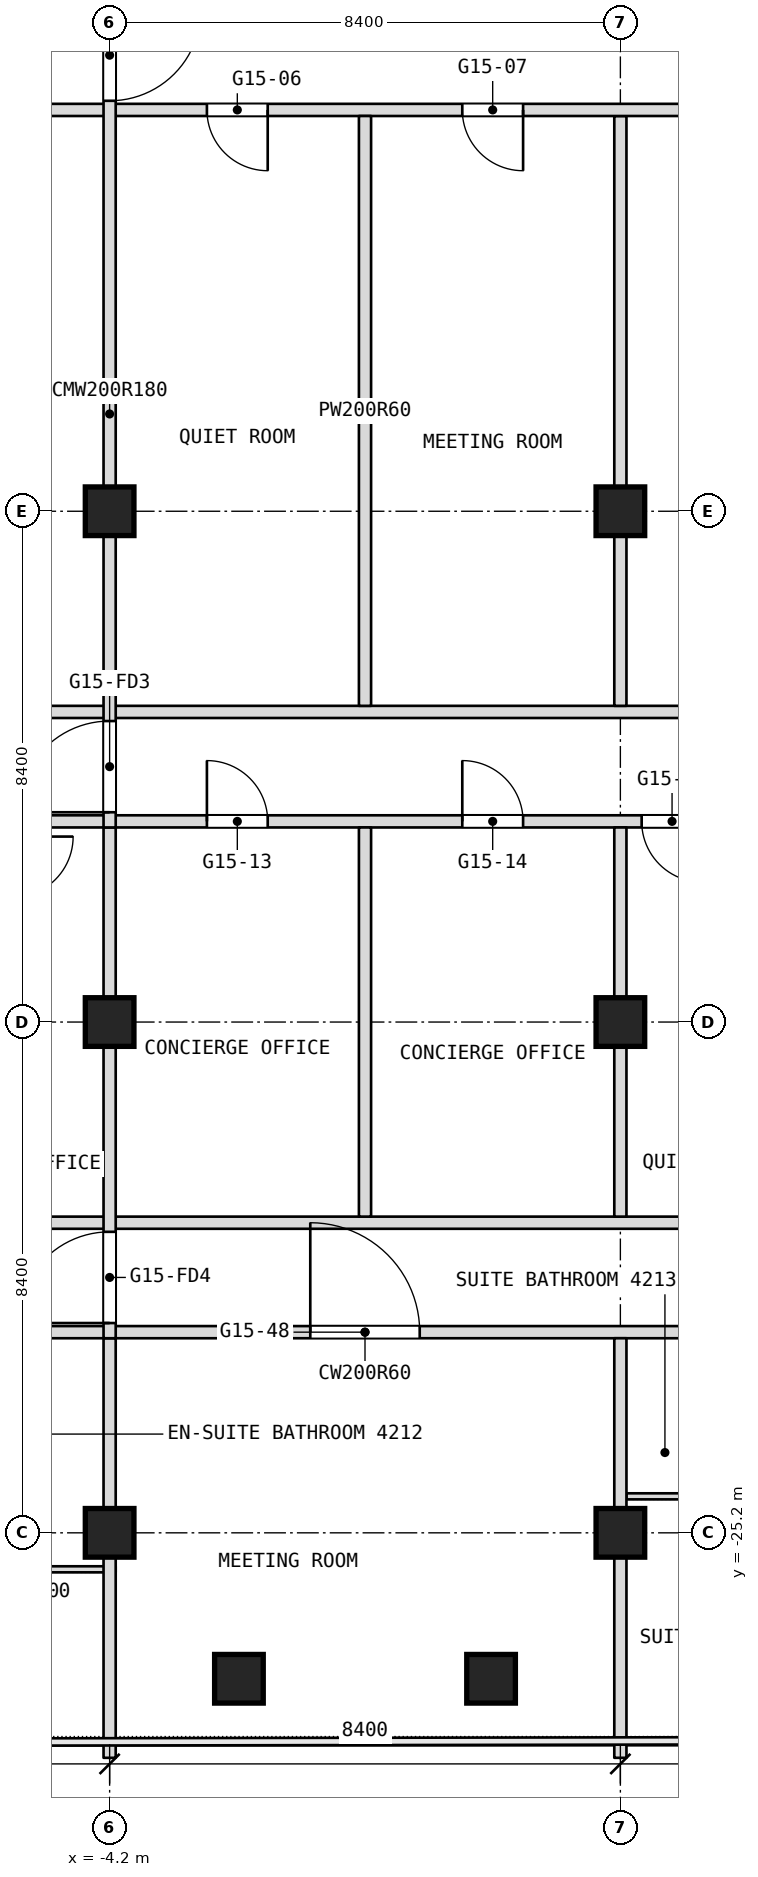
"""IFC4 building model, lengths in metres.
Left out: names, types, materials, properties, quantities, classifications, styles, units other than length and angle.
Written with IfcOpenShell. Run it as: python <this file> out.ifc"""

import sys

from ifc_helpers import new_model, si_unit, direction, frame, frame_2d, origin, origin_2d, place, context, subcontext, project, spatial, rectangle, extrude, element, fill, save


model = new_model("IFC4")
c1 = context("Model", 3, precision=1e-05, world=origin(), true_north=direction((0.0, 1.0)))
c2 = subcontext(c1, "Body", "Model", "MODEL_VIEW")
j1 = project(units=[si_unit("LENGTHUNIT", "METRE"), si_unit("PLANEANGLEUNIT", "RADIAN")], contexts=[c1])
p1 = place(None, origin())
s1 = spatial("IfcSite", under=j1, at=p1, CompositionType="ELEMENT")
p2 = place(p1, origin())
s2 = spatial("IfcBuilding", under=s1, at=p2, CompositionType="ELEMENT")
p3 = place(p2, frame((0.0, 0.0, 187.7)))
s3 = spatial("IfcBuildingStorey", under=s2, at=p3, CompositionType="ELEMENT", Elevation=187.7)
for number, where, z_axis, x_axis in (
    (1, (-4.2, -25.2, 0.0), (0.0, 0.0, 1.0), (1.0, 0.0, 0.0)),
    (2, (-4.2, -16.8, 0.0), (0.0, 0.0, 1.0), (1.0, 0.0, 0.0)),
    (3, (-4.2, -8.4, 0.0), (0.0, 0.0, 1.0), (1.0, 0.0, 0.0)),
    (4, (4.2, -25.2, 0.0), (0.0, 0.0, 1.0), (1.0, 0.0, 0.0)),
    (5, (4.2, -16.8, 0.0), (0.0, 0.0, 1.0), (1.0, 0.0, 0.0)),
    (6, (4.2, -8.4, 0.0), (0.0, 0.0, 1.0), (1.0, 0.0, 0.0)),
    (7, (2.073, -27.6, 0.0), (0.0, 0.0, 1.0), (1.0, 0.0, 0.0)),
    (8, (-2.073, -27.6, 0.0), (0.0, 0.0, 1.0), (1.0, 0.0, 0.0)),
):
    element("IfcColumn", number, at=place(p3, frame(where, z_axis=z_axis, x_axis=x_axis)), inside=s3, PredefinedType="COLUMN", context=c2, shape_type="SweptSolid", body=[
        extrude(rectangle(XDim=0.8, YDim=0.8, at=origin_2d()), origin(), (0.0, 0.0, 1.0), 3.6),
    ])
p4 = place(p3, frame((-6.55, -25.8, 0.0), z_axis=(0.0, 0.0, 1.0), x_axis=(1.0, 0.0, 0.0)))
e9 = element("IfcWall", 9, at=p4, inside=s3, PredefinedType="PARTITIONING", context=c2, shape_type="SweptSolid", body=[
    extrude(rectangle(XDim=2.45, YDim=0.1, at=frame_2d((1.225, 0.0))), origin(), (0.0, 0.0, 1.0), 3.34),
])
p5 = place(p4, frame((0.15, 0.0, 0.0)))
e10 = element("IfcOpeningElement", 10, at=p5, cuts=e9, PredefinedType="OPENING", context=c2, shape_type="SweptSolid", body=[
    extrude(rectangle(XDim=0.9, YDim=2.1, at=frame_2d((0.45, 1.05))), frame((0.0, 0.05, 0.0), z_axis=(0.0, -1.0, 0.0), x_axis=(1.0, 0.0, 0.0)), (0.0, 0.0, 1.0), 0.1),
])
p6 = place(p3, frame((4.3, -24.6, 0.0), z_axis=(0.0, 0.0, 1.0), x_axis=(1.0, 0.0, 0.0)))
e11 = element("IfcWall", 11, at=p6, inside=s3, PredefinedType="PARTITIONING", context=c2, shape_type="SweptSolid", body=[
    extrude(rectangle(XDim=2.35, YDim=0.1, at=frame_2d((1.175, 0.0))), origin(), (0.0, 0.0, 1.0), 3.34),
])
p7 = place(p3, frame((-16.7, -21.9, 0.0), z_axis=(0.0, 0.0, 1.0), x_axis=(1.0, 0.0, 0.0)))
e12 = element("IfcWall", 12, at=p7, inside=s3, PredefinedType="PARTITIONING", context=c2, shape_type="SweptSolid", body=[
    extrude(rectangle(XDim=33.4, YDim=0.2, at=frame_2d((16.7, 0.0))), origin(), (0.0, 0.0, 1.0), 3.34),
])
p8 = place(p7, frame((0.3, 0.0, 0.0)))
e13 = element("IfcOpeningElement", 13, at=p8, cuts=e12, PredefinedType="OPENING", context=c2, shape_type="SweptSolid", body=[
    extrude(rectangle(XDim=1.0, YDim=2.1, at=frame_2d((0.5, 1.05))), frame((0.0, 0.1, 0.0), z_axis=(0.0, -1.0, 0.0), x_axis=(1.0, 0.0, 0.0)), (0.0, 0.0, 1.0), 0.2),
])
p9 = place(p7, frame((6.9, 0.0, 0.0)))
e14 = element("IfcOpeningElement", 14, at=p9, cuts=e12, PredefinedType="OPENING", context=c2, shape_type="SweptSolid", body=[
    extrude(rectangle(XDim=1.0, YDim=2.1, at=frame_2d((0.5, 1.05))), frame((0.0, 0.1, 0.0), z_axis=(0.0, -1.0, 0.0), x_axis=(1.0, 0.0, 0.0)), (0.0, 0.0, 1.0), 0.2),
])
p10 = place(p7, frame((8.7, 0.0, 0.0)))
e15 = element("IfcOpeningElement", 15, at=p10, cuts=e12, PredefinedType="OPENING", context=c2, shape_type="SweptSolid", body=[
    extrude(rectangle(XDim=1.0, YDim=2.1, at=frame_2d((0.5, 1.05))), frame((0.0, 0.1, 0.0), z_axis=(0.0, -1.0, 0.0), x_axis=(1.0, 0.0, 0.0)), (0.0, 0.0, 1.0), 0.2),
])
p11 = place(p7, frame((15.8, 0.0, 0.0)))
e16 = element("IfcOpeningElement", 16, at=p11, cuts=e12, PredefinedType="OPENING", context=c2, shape_type="SweptSolid", body=[
    extrude(rectangle(XDim=1.8, YDim=2.1, at=frame_2d((0.9, 1.05))), frame((0.0, 0.1, 0.0), z_axis=(0.0, -1.0, 0.0), x_axis=(1.0, 0.0, 0.0)), (0.0, 0.0, 1.0), 0.2),
])
p12 = place(p7, frame((26.65, 0.0, 0.0)))
e17 = element("IfcOpeningElement", 17, at=p12, cuts=e12, PredefinedType="OPENING", context=c2, shape_type="SweptSolid", body=[
    extrude(rectangle(XDim=1.1, YDim=2.1, at=frame_2d((0.55, 1.05))), frame((0.0, 0.1, 0.0), z_axis=(0.0, -1.0, 0.0), x_axis=(1.0, 0.0, 0.0)), (0.0, 0.0, 1.0), 0.2),
])
p13 = place(p7, frame((29.7, 0.0, 0.0)))
e18 = element("IfcOpeningElement", 18, at=p13, cuts=e12, PredefinedType="OPENING", context=c2, shape_type="SweptSolid", body=[
    extrude(rectangle(XDim=1.0, YDim=2.1, at=frame_2d((0.5, 1.05))), frame((0.0, 0.1, 0.0), z_axis=(0.0, -1.0, 0.0), x_axis=(1.0, 0.0, 0.0)), (0.0, 0.0, 1.0), 0.2),
])
p14 = place(p3, frame((-16.7, -20.1, 0.0), z_axis=(0.0, 0.0, 1.0), x_axis=(1.0, 0.0, 0.0)))
e19 = element("IfcWall", 19, at=p14, inside=s3, PredefinedType="PARTITIONING", context=c2, shape_type="SweptSolid", body=[
    extrude(rectangle(XDim=33.4, YDim=0.2, at=frame_2d((16.7, 0.0))), origin(), (0.0, 0.0, 1.0), 3.34),
])
p15 = place(p3, frame((-5.9, -13.5, 0.0), z_axis=(0.0, 0.0, 1.0), x_axis=(1.0, 0.0, 0.0)))
e20 = element("IfcWall", 20, at=p15, inside=s3, PredefinedType="PARTITIONING", context=c2, shape_type="SweptSolid", body=[
    extrude(rectangle(XDim=11.6, YDim=0.2, at=frame_2d((5.8, 0.0))), origin(), (0.0, 0.0, 1.0), 3.34),
])
p16 = place(p15, frame((3.3, 0.0, 0.0)))
e21 = element("IfcOpeningElement", 21, at=p16, cuts=e20, PredefinedType="OPENING", context=c2, shape_type="SweptSolid", body=[
    extrude(rectangle(XDim=1.0, YDim=2.1, at=frame_2d((0.5, 1.05))), frame((0.0, 0.1, 0.0), z_axis=(0.0, -1.0, 0.0), x_axis=(1.0, 0.0, 0.0)), (0.0, 0.0, 1.0), 0.2),
])
p17 = place(p15, frame((7.5, 0.0, 0.0)))
e22 = element("IfcOpeningElement", 22, at=p17, cuts=e20, PredefinedType="OPENING", context=c2, shape_type="SweptSolid", body=[
    extrude(rectangle(XDim=1.0, YDim=2.1, at=frame_2d((0.5, 1.05))), frame((0.0, 0.1, 0.0), z_axis=(0.0, -1.0, 0.0), x_axis=(1.0, 0.0, 0.0)), (0.0, 0.0, 1.0), 0.2),
])
p18 = place(p15, frame((10.45, 0.0, 0.0)))
e23 = element("IfcOpeningElement", 23, at=p18, cuts=e20, PredefinedType="OPENING", context=c2, shape_type="SweptSolid", body=[
    extrude(rectangle(XDim=1.0, YDim=2.1, at=frame_2d((0.5, 1.05))), frame((0.0, 0.1, 0.0), z_axis=(0.0, -1.0, 0.0), x_axis=(1.0, 0.0, 0.0)), (0.0, 0.0, 1.0), 0.2),
])
p19 = place(p3, frame((-7.3, -11.7, 0.0), z_axis=(0.0, 0.0, 1.0), x_axis=(1.0, 0.0, 0.0)))
e24 = element("IfcWall", 24, at=p19, inside=s3, PredefinedType="PARTITIONING", context=c2, shape_type="SweptSolid", body=[
    extrude(rectangle(XDim=14.6, YDim=0.2, at=frame_2d((7.3, 0.0))), origin(), (0.0, 0.0, 1.0), 3.34),
])
p20 = place(p3, frame((4.2, -28.9, 0.0), z_axis=(0.0, 0.0, 1.0), x_axis=(0.0, 1.0, 0.0)))
e25 = element("IfcWall", 25, at=p20, inside=s3, PredefinedType="PARTITIONING", context=c2, shape_type="SweptSolid", body=[
    extrude(rectangle(XDim=6.9, YDim=0.2, at=frame_2d((3.45, 0.0))), origin(), (0.0, 0.0, 1.0), 3.34),
])
p21 = place(p3, frame((4.2, -20.0, 0.0), z_axis=(0.0, 0.0, 1.0), x_axis=(0.0, 1.0, 0.0)))
e26 = element("IfcWall", 26, at=p21, inside=s3, PredefinedType="PARTITIONING", context=c2, shape_type="SweptSolid", body=[
    extrude(rectangle(XDim=6.4, YDim=0.2, at=frame_2d((3.2, 0.0))), origin(), (0.0, 0.0, 1.0), 3.34),
])
p22 = place(p3, frame((4.2, -11.6, 0.0), z_axis=(0.0, 0.0, 1.0), x_axis=(0.0, 1.0, 0.0)))
e27 = element("IfcWall", 27, at=p22, inside=s3, PredefinedType="PARTITIONING", context=c2, shape_type="SweptSolid", body=[
    extrude(rectangle(XDim=9.7, YDim=0.2, at=frame_2d((4.85, 0.0))), origin(), (0.0, 0.0, 1.0), 3.34),
])
p23 = place(p3, frame((-16.9, -1.8, 0.0), z_axis=(0.0, 0.0, 1.0), x_axis=(1.0, 0.0, 0.0)))
e28 = element("IfcWall", 28, at=p23, inside=s3, PredefinedType="PARTITIONING", context=c2, shape_type="SweptSolid", body=[
    extrude(rectangle(XDim=33.8, YDim=0.2, at=frame_2d((16.9, 0.0))), origin(), (0.0, 0.0, 1.0), 3.34),
])
p24 = place(p23, frame((1.7, 0.0, 0.0)))
e29 = element("IfcOpeningElement", 29, at=p24, cuts=e28, PredefinedType="OPENING", context=c2, shape_type="SweptSolid", body=[
    extrude(rectangle(XDim=1.0, YDim=2.1, at=frame_2d((0.5, 1.05))), frame((0.0, 0.1, 0.0), z_axis=(0.0, -1.0, 0.0), x_axis=(1.0, 0.0, 0.0)), (0.0, 0.0, 1.0), 0.2),
])
p25 = place(p23, frame((5.9, 0.0, 0.0)))
e30 = element("IfcOpeningElement", 30, at=p25, cuts=e28, PredefinedType="OPENING", context=c2, shape_type="SweptSolid", body=[
    extrude(rectangle(XDim=1.0, YDim=2.1, at=frame_2d((0.5, 1.05))), frame((0.0, 0.1, 0.0), z_axis=(0.0, -1.0, 0.0), x_axis=(1.0, 0.0, 0.0)), (0.0, 0.0, 1.0), 0.2),
])
p26 = place(p23, frame((10.1, 0.0, 0.0)))
e31 = element("IfcOpeningElement", 31, at=p26, cuts=e28, PredefinedType="OPENING", context=c2, shape_type="SweptSolid", body=[
    extrude(rectangle(XDim=1.0, YDim=2.1, at=frame_2d((0.5, 1.05))), frame((0.0, 0.1, 0.0), z_axis=(0.0, -1.0, 0.0), x_axis=(1.0, 0.0, 0.0)), (0.0, 0.0, 1.0), 0.2),
])
p27 = place(p23, frame((14.3, 0.0, 0.0)))
e32 = element("IfcOpeningElement", 32, at=p27, cuts=e28, PredefinedType="OPENING", context=c2, shape_type="SweptSolid", body=[
    extrude(rectangle(XDim=1.0, YDim=2.1, at=frame_2d((0.5, 1.05))), frame((0.0, 0.1, 0.0), z_axis=(0.0, -1.0, 0.0), x_axis=(1.0, 0.0, 0.0)), (0.0, 0.0, 1.0), 0.2),
])
p28 = place(p23, frame((18.5, 0.0, 0.0)))
e33 = element("IfcOpeningElement", 33, at=p28, cuts=e28, PredefinedType="OPENING", context=c2, shape_type="SweptSolid", body=[
    extrude(rectangle(XDim=1.0, YDim=2.1, at=frame_2d((0.5, 1.05))), frame((0.0, 0.1, 0.0), z_axis=(0.0, -1.0, 0.0), x_axis=(1.0, 0.0, 0.0)), (0.0, 0.0, 1.0), 0.2),
])
p29 = place(p23, frame((24.4, 0.0, 0.0)))
e34 = element("IfcOpeningElement", 34, at=p29, cuts=e28, PredefinedType="OPENING", context=c2, shape_type="SweptSolid", body=[
    extrude(rectangle(XDim=1.8, YDim=2.1, at=frame_2d((0.9, 1.05))), frame((0.0, 0.1, 0.0), z_axis=(0.0, -1.0, 0.0), x_axis=(1.0, 0.0, 0.0)), (0.0, 0.0, 1.0), 0.2),
])
p30 = place(p23, frame((31.1, 0.0, 0.0)))
e35 = element("IfcOpeningElement", 35, at=p30, cuts=e28, PredefinedType="OPENING", context=c2, shape_type="SweptSolid", body=[
    extrude(rectangle(XDim=1.0, YDim=2.1, at=frame_2d((0.5, 1.05))), frame((0.0, 0.1, 0.0), z_axis=(0.0, -1.0, 0.0), x_axis=(1.0, 0.0, 0.0)), (0.0, 0.0, 1.0), 0.2),
])
p31 = place(p3, frame((0.0, -20.0, 0.0), z_axis=(0.0, 0.0, 1.0), x_axis=(0.0, 1.0, 0.0)))
e36 = element("IfcWall", 36, at=p31, inside=s3, PredefinedType="PARTITIONING", context=c2, shape_type="SweptSolid", body=[
    extrude(rectangle(XDim=6.4, YDim=0.2, at=frame_2d((3.2, 0.0))), origin(), (0.0, 0.0, 1.0), 3.34),
])
p32 = place(p3, frame((0.0, -11.6, 0.0), z_axis=(0.0, 0.0, 1.0), x_axis=(0.0, 1.0, 0.0)))
e37 = element("IfcWall", 37, at=p32, inside=s3, PredefinedType="PARTITIONING", context=c2, shape_type="SweptSolid", body=[
    extrude(rectangle(XDim=9.7, YDim=0.2, at=frame_2d((4.85, 0.0))), origin(), (0.0, 0.0, 1.0), 3.34),
])
p33 = place(p3, frame((-4.2, -28.9, 0.0), z_axis=(0.0, 0.0, 1.0), x_axis=(0.0, 1.0, 0.0)))
e38 = element("IfcWall", 38, at=p33, inside=s3, PredefinedType="PARTITIONING", context=c2, shape_type="SweptSolid", body=[
    extrude(rectangle(XDim=6.9, YDim=0.2, at=frame_2d((3.45, 0.0))), origin(), (0.0, 0.0, 1.0), 3.34),
])
p34 = place(p3, frame((-4.2, -22.0, 0.0), z_axis=(0.0, 0.0, 1.0), x_axis=(0.0, 1.0, 0.0)))
e39 = element("IfcWall", 39, at=p34, inside=s3, PredefinedType="PARTITIONING", context=c2, shape_type="SweptSolid", body=[
    extrude(rectangle(XDim=8.4, YDim=0.2, at=frame_2d((4.2, 0.0))), origin(), (0.0, 0.0, 1.0), 3.34),
])
p35 = place(p34, frame((0.25, 0.0, 0.0)))
e40 = element("IfcOpeningElement", 40, at=p35, cuts=e39, PredefinedType="OPENING", context=c2, shape_type="SweptSolid", body=[
    extrude(rectangle(XDim=1.5, YDim=2.1, at=frame_2d((0.75, 1.05))), frame((0.0, 0.1, 0.0), z_axis=(0.0, -1.0, 0.0), x_axis=(1.0, 0.0, 0.0)), (0.0, 0.0, 1.0), 0.2),
])
p36 = place(p3, frame((-4.2, -13.6, 0.0), z_axis=(0.0, 0.0, 1.0), x_axis=(0.0, 1.0, 0.0)))
e41 = element("IfcWall", 41, at=p36, inside=s3, PredefinedType="PARTITIONING", context=c2, shape_type="SweptSolid", body=[
    extrude(rectangle(XDim=13.6, YDim=0.2, at=frame_2d((6.8, 0.0))), origin(), (0.0, 0.0, 1.0), 3.34),
])
p37 = place(p36, frame((11.95, 0.0, 0.0)))
e42 = element("IfcOpeningElement", 42, at=p37, cuts=e41, PredefinedType="OPENING", context=c2, shape_type="SweptSolid", body=[
    extrude(rectangle(XDim=1.5, YDim=2.1, at=frame_2d((0.75, 1.05))), frame((0.0, 0.1, 0.0), z_axis=(0.0, -1.0, 0.0), x_axis=(1.0, 0.0, 0.0)), (0.0, 0.0, 1.0), 0.2),
])
p38 = place(p36, frame((0.25, 0.0, 0.0)))
e43 = element("IfcOpeningElement", 43, at=p38, cuts=e41, PredefinedType="OPENING", context=c2, shape_type="SweptSolid", body=[
    extrude(rectangle(XDim=1.5, YDim=2.1, at=frame_2d((0.75, 1.05))), frame((0.0, 0.1, 0.0), z_axis=(0.0, -1.0, 0.0), x_axis=(1.0, 0.0, 0.0)), (0.0, 0.0, 1.0), 0.2),
])
p39 = place(p11, origin())
e44 = element("IfcDoor", 44, at=p39, inside=s3, OperationType="DOUBLE_DOOR_SINGLE_SWING", PredefinedType="DOOR", context=c2, shape_type="SweptSolid", body=[
    extrude(rectangle(XDim=1.8, YDim=2.1, at=frame_2d((0.9, 1.05))), frame((0.0, 0.025, 0.0), z_axis=(0.0, -1.0, 0.0), x_axis=(1.0, 0.0, 0.0)), (0.0, 0.0, 1.0), 0.05),
])
fill(e16, e44)
p40 = place(p16, origin())
e45 = element("IfcDoor", 45, at=p40, inside=s3, OperationType="SINGLE_SWING_LEFT", PredefinedType="DOOR", context=c2, shape_type="SweptSolid", body=[
    extrude(rectangle(XDim=1.0, YDim=2.1, at=frame_2d((0.5, 1.05))), frame((0.0, 0.025, 0.0), z_axis=(0.0, -1.0, 0.0), x_axis=(1.0, 0.0, 0.0)), (0.0, 0.0, 1.0), 0.05),
])
fill(e21, e45)
p41 = place(p17, origin())
e46 = element("IfcDoor", 46, at=p41, inside=s3, OperationType="SINGLE_SWING_RIGHT", PredefinedType="DOOR", context=c2, shape_type="SweptSolid", body=[
    extrude(rectangle(XDim=1.0, YDim=2.1, at=frame_2d((0.5, 1.05))), frame((0.0, 0.025, 0.0), z_axis=(0.0, -1.0, 0.0), x_axis=(1.0, 0.0, 0.0)), (0.0, 0.0, 1.0), 0.05),
])
fill(e22, e46)
p42 = place(p18, origin())
e47 = element("IfcDoor", 47, at=p42, inside=s3, OperationType="SINGLE_SWING_LEFT", PredefinedType="DOOR", context=c2, shape_type="SweptSolid", body=[
    extrude(rectangle(XDim=1.0, YDim=2.1, at=frame_2d((0.5, 1.05))), frame((0.0, 0.025, 0.0), z_axis=(0.0, -1.0, 0.0), x_axis=(1.0, 0.0, 0.0)), (0.0, 0.0, 1.0), 0.05),
])
fill(e23, e47)
p43 = place(p27, origin())
e48 = element("IfcDoor", 48, at=p43, inside=s3, OperationType="SINGLE_SWING_LEFT", PredefinedType="DOOR", context=c2, shape_type="SweptSolid", body=[
    extrude(rectangle(XDim=1.0, YDim=2.1, at=frame_2d((0.5, 1.05))), frame((0.0, 0.025, 0.0), z_axis=(0.0, -1.0, 0.0), x_axis=(1.0, 0.0, 0.0)), (0.0, 0.0, 1.0), 0.05),
])
fill(e32, e48)
p44 = place(p28, origin())
e49 = element("IfcDoor", 49, at=p44, inside=s3, OperationType="SINGLE_SWING_RIGHT", PredefinedType="DOOR", context=c2, shape_type="SweptSolid", body=[
    extrude(rectangle(XDim=1.0, YDim=2.1, at=frame_2d((0.5, 1.05))), frame((0.0, 0.025, 0.0), z_axis=(0.0, -1.0, 0.0), x_axis=(1.0, 0.0, 0.0)), (0.0, 0.0, 1.0), 0.05),
])
fill(e33, e49)
p45 = place(p37, origin())
e50 = element("IfcDoor", 50, at=p45, inside=s3, OperationType="DOUBLE_DOOR_DOUBLE_SWING", PredefinedType="DOOR", context=c2, shape_type="SweptSolid", body=[
    extrude(rectangle(XDim=1.5, YDim=2.1, at=frame_2d((0.75, 1.05))), frame((0.0, 0.025, 0.0), z_axis=(0.0, -1.0, 0.0), x_axis=(1.0, 0.0, 0.0)), (0.0, 0.0, 1.0), 0.05),
])
fill(e42, e50)
p46 = place(p38, origin())
e51 = element("IfcDoor", 51, at=p46, inside=s3, OperationType="DOUBLE_DOOR_DOUBLE_SWING", PredefinedType="DOOR", context=c2, shape_type="SweptSolid", body=[
    extrude(rectangle(XDim=1.5, YDim=2.1, at=frame_2d((0.75, 1.05))), frame((0.0, 0.025, 0.0), z_axis=(0.0, -1.0, 0.0), x_axis=(1.0, 0.0, 0.0)), (0.0, 0.0, 1.0), 0.05),
])
fill(e43, e51)
p47 = place(p35, origin())
e52 = element("IfcDoor", 52, at=p47, inside=s3, OperationType="DOUBLE_DOOR_DOUBLE_SWING", PredefinedType="DOOR", context=c2, shape_type="SweptSolid", body=[
    extrude(rectangle(XDim=1.5, YDim=2.1, at=frame_2d((0.75, 1.05))), frame((0.0, 0.025, 0.0), z_axis=(0.0, -1.0, 0.0), x_axis=(1.0, 0.0, 0.0)), (0.0, 0.0, 1.0), 0.05),
])
fill(e40, e52)
save(model, sys.argv[1])
